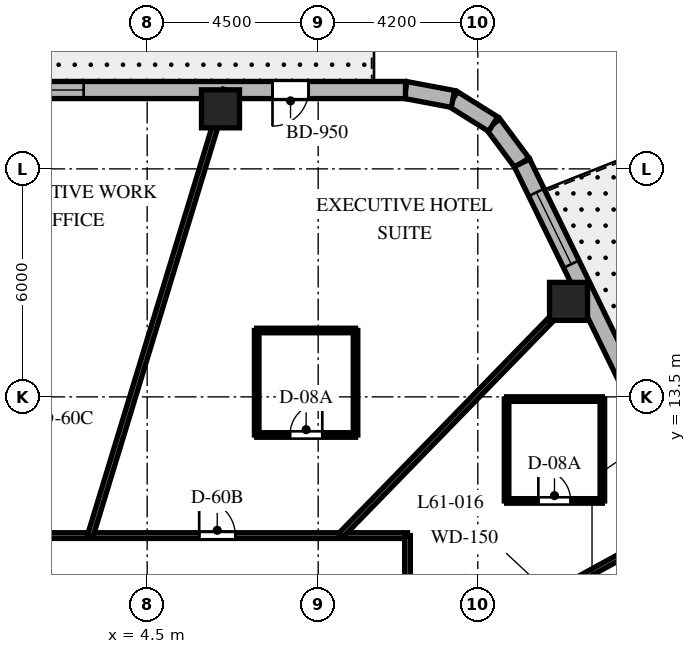
"""IFC4 building model, lengths in metres.
Left out: names, types, materials, properties, quantities, classifications, styles, units other than length and angle.
Written with IfcOpenShell. Run it as: python <this file> out.ifc"""

import sys

from ifc_helpers import new_model, si_unit, direction, frame, frame_2d, origin, origin_2d, place, context, subcontext, project, spatial, rectangle, extrude, element, fill, save


model = new_model("IFC4")
c1 = context("Model", 3, precision=1e-05, world=origin(), true_north=direction((0.0, 1.0)))
c2 = subcontext(c1, "Body", "Model", "MODEL_VIEW")
j1 = project(units=[si_unit("LENGTHUNIT", "METRE"), si_unit("PLANEANGLEUNIT", "RADIAN")], contexts=[c1])
p1 = place(None, origin())
s1 = spatial("IfcSite", under=j1, at=p1, CompositionType="ELEMENT")
p2 = place(p1, origin())
s2 = spatial("IfcBuilding", under=s1, at=p2, CompositionType="ELEMENT")
p3 = place(p2, frame((0.0, 0.0, 244.5)))
s3 = spatial("IfcBuildingStorey", under=s2, at=p3, CompositionType="ELEMENT", Elevation=244.5)
for number, where, z_axis, x_axis in (
    (1, (15.587, 16.013, 0.0), (0.0, 0.0, 1.0), (1.0, 0.0, 0.0)),
    (2, (6.43, 21.08, 0.0), (0.0, 0.0, 1.0), (1.0, 0.0, 0.0)),
):
    element("IfcColumn", number, at=place(p3, frame(where, z_axis=z_axis, x_axis=x_axis)), inside=s3, PredefinedType="COLUMN", context=c2, shape_type="SweptSolid", body=[
        extrude(rectangle(XDim=1.0, YDim=1.0, at=origin_2d()), origin(), (0.0, 0.0, 1.0), 3.8),
    ])
p4 = place(p3, frame((14.362, 19.658, 0.0), z_axis=(0.0, 0.0, 1.0), x_axis=(-0.596642462792, 0.80250717853, 0.0)))
e3 = element("IfcWall", 3, at=p4, inside=s3, PredefinedType="SOLIDWALL", context=c2, shape_type="SweptSolid", body=[
    extrude(rectangle(XDim=1.27, YDim=0.45, at=frame_2d((0.635, 0.0))), origin(), (0.0, 0.0, 1.0), 3.5),
])
p5 = place(p3, frame((13.604, 20.678, 0.0), z_axis=(0.0, 0.0, 1.0), x_axis=(-0.847910404124, 0.53013955387, 0.0)))
e4 = element("IfcWall", 4, at=p5, inside=s3, PredefinedType="SOLIDWALL", context=c2, shape_type="SweptSolid", body=[
    extrude(rectangle(XDim=1.249, YDim=0.45, at=frame_2d((0.624, 0.0))), origin(), (0.0, 0.0, 1.0), 3.5),
])
p6 = place(p3, frame((12.546, 21.34, 0.0), z_axis=(0.0, 0.0, 1.0), x_axis=(-0.982686750835, 0.18527479519, 0.0)))
e5 = element("IfcWall", 5, at=p6, inside=s3, PredefinedType="SOLIDWALL", context=c2, shape_type="SweptSolid", body=[
    extrude(rectangle(XDim=1.27, YDim=0.45, at=frame_2d((0.635, 0.0))), origin(), (0.0, 0.0, 1.0), 3.5),
])
p7 = place(p3, frame((22.74, 2.452, 0.0), z_axis=(0.0, 0.0, 1.0), x_axis=(-0.437753424814, 0.899095066755, 0.0)))
e6 = element("IfcWall", 6, at=p7, inside=s3, PredefinedType="SOLIDWALL", context=c2, shape_type="SweptSolid", body=[
    extrude(rectangle(XDim=19.137, YDim=0.45, at=frame_2d((9.569, 0.0))), origin(), (0.0, 0.0, 1.0), 3.5),
])
p8 = place(p7, frame((4.763, 0.0, 0.0)))
e7 = element("IfcOpeningElement", 7, at=p8, cuts=e6, PredefinedType="OPENING", context=c2, shape_type="SweptSolid", body=[
    extrude(rectangle(XDim=1.0, YDim=2.15, at=frame_2d((0.5, 1.075))), frame((0.0, 0.235, 0.0), z_axis=(0.0, -1.0, 0.0), x_axis=(1.0, 0.0, 0.0)), (0.0, 0.0, 1.0), 0.47),
])
p9 = place(p7, frame((6.611, 0.0, 0.8)))
e8 = element("IfcOpeningElement", 8, at=p9, cuts=e6, PredefinedType="OPENING", context=c2, shape_type="SweptSolid", body=[
    extrude(rectangle(XDim=1.2, YDim=1.8, at=frame_2d((0.6, 0.9))), frame((0.0, 0.235, 0.0), z_axis=(0.0, -1.0, 0.0), x_axis=(1.0, 0.0, 0.0)), (0.0, 0.0, 1.0), 0.47),
])
p10 = place(p7, frame((10.856, 0.0, 0.8)))
e9 = element("IfcOpeningElement", 9, at=p10, cuts=e6, PredefinedType="OPENING", context=c2, shape_type="SweptSolid", body=[
    extrude(rectangle(XDim=2.1, YDim=1.85, at=frame_2d((1.05, 0.925))), frame((0.0, 0.235, 0.0), z_axis=(0.0, -1.0, 0.0), x_axis=(1.0, 0.0, 0.0)), (0.0, 0.0, 1.0), 0.47),
])
p11 = place(p7, frame((16.173, 0.0, 0.8)))
e10 = element("IfcOpeningElement", 10, at=p11, cuts=e6, PredefinedType="OPENING", context=c2, shape_type="SweptSolid", body=[
    extrude(rectangle(XDim=2.1, YDim=1.85, at=frame_2d((1.05, 0.925))), frame((0.0, 0.235, 0.0), z_axis=(0.0, -1.0, 0.0), x_axis=(1.0, 0.0, 0.0)), (0.0, 0.0, 1.0), 0.47),
])
p12 = place(p7, frame((0.916, 0.0, 0.8)))
e11 = element("IfcOpeningElement", 11, at=p12, cuts=e6, PredefinedType="OPENING", context=c2, shape_type="SweptSolid", body=[
    extrude(rectangle(XDim=2.1, YDim=1.85, at=frame_2d((1.05, 0.925))), frame((0.0, 0.235, 0.0), z_axis=(0.0, -1.0, 0.0), x_axis=(1.0, 0.0, 0.0)), (0.0, 0.0, 1.0), 0.47),
])
p13 = place(p3, frame((11.298, 21.575, 0.0), z_axis=(0.0, 0.0, 1.0), x_axis=(-1.0, 0.0, 0.0)))
e12 = element("IfcWall", 12, at=p13, inside=s3, PredefinedType="SOLIDWALL", context=c2, shape_type="SweptSolid", body=[
    extrude(rectangle(XDim=24.399, YDim=0.45, at=frame_2d((12.2, 0.0))), origin(), (0.0, 0.0, 1.0), 3.5),
])
p14 = place(p13, frame((2.55, 0.0, 0.0)))
e13 = element("IfcOpeningElement", 13, at=p14, cuts=e12, PredefinedType="OPENING", context=c2, shape_type="SweptSolid", body=[
    extrude(rectangle(XDim=0.95, YDim=2.15, at=frame_2d((0.475, 1.075))), frame((0.0, 0.235, 0.0), z_axis=(0.0, -1.0, 0.0), x_axis=(1.0, 0.0, 0.0)), (0.0, 0.0, 1.0), 0.47),
])
p15 = place(p13, frame((8.469, 0.0, 0.8)))
e14 = element("IfcOpeningElement", 14, at=p15, cuts=e12, PredefinedType="OPENING", context=c2, shape_type="SweptSolid", body=[
    extrude(rectangle(XDim=1.5, YDim=1.8, at=frame_2d((0.75, 0.9))), frame((0.0, 0.235, 0.0), z_axis=(0.0, -1.0, 0.0), x_axis=(1.0, 0.0, 0.0)), (0.0, 0.0, 1.0), 0.47),
])
p16 = place(p13, frame((15.222, 0.0, 0.8)))
e15 = element("IfcOpeningElement", 15, at=p16, cuts=e12, PredefinedType="OPENING", context=c2, shape_type="SweptSolid", body=[
    extrude(rectangle(XDim=1.5, YDim=1.8, at=frame_2d((0.75, 0.9))), frame((0.0, 0.235, 0.0), z_axis=(0.0, -1.0, 0.0), x_axis=(1.0, 0.0, 0.0)), (0.0, 0.0, 1.0), 0.47),
])
p17 = place(p13, frame((21.296, 0.0, 0.8)))
e16 = element("IfcOpeningElement", 16, at=p17, cuts=e12, PredefinedType="OPENING", context=c2, shape_type="SweptSolid", body=[
    extrude(rectangle(XDim=1.5, YDim=1.8, at=frame_2d((0.75, 0.9))), frame((0.0, 0.235, 0.0), z_axis=(0.0, -1.0, 0.0), x_axis=(1.0, 0.0, 0.0)), (0.0, 0.0, 1.0), 0.47),
])
p18 = place(p3, frame((0.92, 9.85, 0.0), z_axis=(0.0, 0.0, 1.0), x_axis=(1.0, 0.0, 0.0)))
e17 = element("IfcWall", 17, at=p18, inside=s3, PredefinedType="PARTITIONING", context=c2, shape_type="SweptSolid", body=[
    extrude(rectangle(XDim=10.43, YDim=0.15, at=frame_2d((5.215, 0.0))), origin(), (0.0, 0.0, 1.0), 2.99),
])
p19 = place(p18, frame((4.949, 0.0, 0.0)))
e18 = element("IfcOpeningElement", 18, at=p19, cuts=e17, PredefinedType="OPENING", context=c2, shape_type="SweptSolid", body=[
    extrude(rectangle(XDim=0.95, YDim=2.03, at=frame_2d((0.475, 1.015))), frame((0.0, 0.085, 0.0), z_axis=(0.0, -1.0, 0.0), x_axis=(1.0, 0.0, 0.0)), (0.0, 0.0, 1.0), 0.17),
])
p20 = place(p3, frame((11.35, 9.85, 0.0), z_axis=(0.0, 0.0, 1.0), x_axis=(0.0, -1.0, 0.0)))
e19 = element("IfcWall", 19, at=p20, inside=s3, PredefinedType="PARTITIONING", context=c2, shape_type="SweptSolid", body=[
    extrude(rectangle(XDim=12.4, YDim=0.15, at=frame_2d((6.2, 0.0))), origin(), (0.0, 0.0, 1.0), 2.99),
])
p21 = place(p20, frame((4.709, 0.0, 0.0)))
e20 = element("IfcOpeningElement", 20, at=p21, cuts=e19, PredefinedType="OPENING", context=c2, shape_type="SweptSolid", body=[
    extrude(rectangle(XDim=0.9, YDim=2.03, at=frame_2d((0.45, 1.015))), frame((0.0, 0.085, 0.0), z_axis=(0.0, -1.0, 0.0), x_axis=(1.0, 0.0, 0.0)), (0.0, 0.0, 1.0), 0.17),
])
p22 = place(p20, frame((1.457, 0.0, 0.0)))
e21 = element("IfcOpeningElement", 21, at=p22, cuts=e19, PredefinedType="OPENING", context=c2, shape_type="SweptSolid", body=[
    extrude(rectangle(XDim=0.95, YDim=2.03, at=frame_2d((0.475, 1.015))), frame((0.0, 0.085, 0.0), z_axis=(0.0, -1.0, 0.0), x_axis=(1.0, 0.0, 0.0)), (0.0, 0.0, 1.0), 0.17),
])
p23 = place(p20, frame((8.835, 0.0, 0.0)))
e22 = element("IfcOpeningElement", 22, at=p23, cuts=e19, PredefinedType="OPENING", context=c2, shape_type="SweptSolid", body=[
    extrude(rectangle(XDim=0.95, YDim=2.03, at=frame_2d((0.475, 1.015))), frame((0.0, 0.085, 0.0), z_axis=(0.0, -1.0, 0.0), x_axis=(1.0, 0.0, 0.0)), (0.0, 0.0, 1.0), 0.17),
])
p24 = place(p3, frame((11.35, 6.227, 0.0), z_axis=(0.0, 0.0, 1.0), x_axis=(0.876723190824, 0.480995266786, 0.0)))
e23 = element("IfcWall", 23, at=p24, inside=s3, PredefinedType="PARTITIONING", context=c2, shape_type="SweptSolid", body=[
    extrude(rectangle(XDim=8.598, YDim=0.15, at=frame_2d((4.299, 0.0))), origin(), (0.0, 0.0, 1.0), 2.74),
])
p25 = place(p3, frame((9.588, 9.85, 0.0), z_axis=(0.0, 0.0, 1.0), x_axis=(0.697519469595, 0.716565830567, 0.0)))
e24 = element("IfcWall", 24, at=p25, inside=s3, PredefinedType="PARTITIONING", context=c2, shape_type="SweptSolid", body=[
    extrude(rectangle(XDim=9.126, YDim=0.15, at=frame_2d((4.563, 0.0))), origin(), (0.0, 0.0, 1.0), 2.74),
])
p26 = place(p3, frame((3.004, 9.85, 0.0), z_axis=(0.0, 0.0, 1.0), x_axis=(0.291775760688, 0.956486751333, 0.0)))
e25 = element("IfcWall", 25, at=p26, inside=s3, PredefinedType="PARTITIONING", context=c2, shape_type="SweptSolid", body=[
    extrude(rectangle(XDim=12.258, YDim=0.15, at=frame_2d((6.129, 0.0))), origin(), (0.0, 0.0, 1.0), 2.74),
])
p27 = place(p3, frame((13.958, 10.762, 0.0), z_axis=(0.0, 0.0, 1.0), x_axis=(1.0, 0.0, 0.0)))
e26 = element("IfcWall", 26, at=p27, inside=s3, PredefinedType="PARTITIONING", context=c2, shape_type="SweptSolid", body=[
    extrude(rectangle(XDim=2.52, YDim=0.12, at=frame_2d((1.26, 0.0))), origin(), (0.0, 0.0, 1.0), 3.027),
])
p28 = place(p27, frame((0.835, 0.0, 0.0)))
e27 = element("IfcOpeningElement", 27, at=p28, cuts=e26, PredefinedType="OPENING", context=c2, shape_type="SweptSolid", body=[
    extrude(rectangle(XDim=0.85, YDim=2.03, at=frame_2d((0.425, 1.015))), frame((0.0, 0.07, 0.0), z_axis=(0.0, -1.0, 0.0), x_axis=(1.0, 0.0, 0.0)), (0.0, 0.0, 1.0), 0.14),
])
p29 = place(p3, frame((16.478, 10.762, 0.0), z_axis=(0.0, 0.0, 1.0), x_axis=(0.0, 1.0, 0.0)))
e28 = element("IfcWall", 28, at=p29, inside=s3, PredefinedType="PARTITIONING", context=c2, shape_type="SweptSolid", body=[
    extrude(rectangle(XDim=2.68, YDim=0.12, at=frame_2d((1.34, 0.0))), origin(), (0.0, 0.0, 1.0), 3.5),
])
p30 = place(p3, frame((16.478, 13.442, 0.0), z_axis=(0.0, 0.0, 1.0), x_axis=(-1.0, 0.0, 0.0)))
e29 = element("IfcWall", 29, at=p30, inside=s3, PredefinedType="PARTITIONING", context=c2, shape_type="SweptSolid", body=[
    extrude(rectangle(XDim=2.52, YDim=0.12, at=frame_2d((1.26, 0.0))), origin(), (0.0, 0.0, 1.0), 3.5),
])
p31 = place(p3, frame((13.958, 13.442, 0.0), z_axis=(0.0, 0.0, 1.0), x_axis=(0.0, -1.0, 0.0)))
e30 = element("IfcWall", 30, at=p31, inside=s3, PredefinedType="PARTITIONING", context=c2, shape_type="SweptSolid", body=[
    extrude(rectangle(XDim=2.68, YDim=0.12, at=frame_2d((1.34, 0.0))), origin(), (0.0, 0.0, 1.0), 3.027),
])
p32 = place(p3, frame((7.383, 12.497, 0.0), z_axis=(0.0, 0.0, 1.0), x_axis=(1.0, 0.0, 0.0)))
e31 = element("IfcWall", 31, at=p32, inside=s3, PredefinedType="PARTITIONING", context=c2, shape_type="SweptSolid", body=[
    extrude(rectangle(XDim=2.6, YDim=0.12, at=frame_2d((1.3, 0.0))), origin(), (0.0, 0.0, 1.0), 2.94),
])
p33 = place(p32, frame((0.875, 0.0, 0.0)))
e32 = element("IfcOpeningElement", 32, at=p33, cuts=e31, PredefinedType="OPENING", context=c2, shape_type="SweptSolid", body=[
    extrude(rectangle(XDim=0.85, YDim=2.03, at=frame_2d((0.425, 1.015))), frame((0.0, 0.07, 0.0), z_axis=(0.0, -1.0, 0.0), x_axis=(1.0, 0.0, 0.0)), (0.0, 0.0, 1.0), 0.14),
])
p34 = place(p3, frame((9.983, 12.497, 0.0), z_axis=(0.0, 0.0, 1.0), x_axis=(0.0, 1.0, 0.0)))
e33 = element("IfcWall", 33, at=p34, inside=s3, PredefinedType="PARTITIONING", context=c2, shape_type="SweptSolid", body=[
    extrude(rectangle(XDim=2.75, YDim=0.12, at=frame_2d((1.375, 0.0))), origin(), (0.0, 0.0, 1.0), 3.073),
])
p35 = place(p3, frame((9.983, 15.247, 0.0), z_axis=(0.0, 0.0, 1.0), x_axis=(-1.0, 0.0, 0.0)))
e34 = element("IfcWall", 34, at=p35, inside=s3, PredefinedType="PARTITIONING", context=c2, shape_type="SweptSolid", body=[
    extrude(rectangle(XDim=2.6, YDim=0.12, at=frame_2d((1.3, 0.0))), origin(), (0.0, 0.0, 1.0), 3.073),
])
p36 = place(p3, frame((7.383, 15.247, 0.0), z_axis=(0.0, 0.0, 1.0), x_axis=(0.0, -1.0, 0.0)))
e35 = element("IfcWall", 35, at=p36, inside=s3, PredefinedType="PARTITIONING", context=c2, shape_type="SweptSolid", body=[
    extrude(rectangle(XDim=2.75, YDim=0.12, at=frame_2d((1.375, 0.0))), origin(), (0.0, 0.0, 1.0), 2.94),
])
p37 = place(p11, origin())
e36 = element("IfcWindow", 36, at=p37, inside=s3, PartitioningType="SINGLE_PANEL", PredefinedType="WINDOW", context=c2, shape_type="SweptSolid", body=[
    extrude(rectangle(XDim=2.1, YDim=1.85, at=frame_2d((1.05, 0.925))), frame((0.0, 0.03, 0.0), z_axis=(0.0, -1.0, 0.0), x_axis=(1.0, 0.0, 0.0)), (0.0, 0.0, 1.0), 0.06),
])
fill(e10, e36)
p38 = place(p14, origin())
e37 = element("IfcDoor", 37, at=p38, inside=s3, OperationType="SINGLE_SWING_RIGHT", PredefinedType="DOOR", context=c2, shape_type="SweptSolid", body=[
    extrude(rectangle(XDim=0.95, YDim=2.15, at=frame_2d((0.475, 1.075))), frame((0.0, 0.025, 0.0), z_axis=(0.0, -1.0, 0.0), x_axis=(1.0, 0.0, 0.0)), (0.0, 0.0, 1.0), 0.05),
])
fill(e13, e37)
p39 = place(p15, origin())
e38 = element("IfcWindow", 38, at=p39, inside=s3, PartitioningType="SINGLE_PANEL", PredefinedType="WINDOW", context=c2, shape_type="SweptSolid", body=[
    extrude(rectangle(XDim=1.5, YDim=1.8, at=frame_2d((0.75, 0.9))), frame((0.0, 0.03, 0.0), z_axis=(0.0, -1.0, 0.0), x_axis=(1.0, 0.0, 0.0)), (0.0, 0.0, 1.0), 0.06),
])
fill(e14, e38)
p40 = place(p28, origin())
e39 = element("IfcDoor", 39, at=p40, inside=s3, OperationType="SINGLE_SWING_LEFT", PredefinedType="DOOR", context=c2, shape_type="SweptSolid", body=[
    extrude(rectangle(XDim=0.85, YDim=2.03, at=frame_2d((0.425, 1.015))), frame((0.0, 0.025, 0.0), z_axis=(0.0, -1.0, 0.0), x_axis=(1.0, 0.0, 0.0)), (0.0, 0.0, 1.0), 0.05),
])
fill(e27, e39)
p41 = place(p19, origin())
e40 = element("IfcDoor", 40, at=p41, inside=s3, OperationType="SINGLE_SWING_LEFT", PredefinedType="DOOR", context=c2, shape_type="SweptSolid", body=[
    extrude(rectangle(XDim=0.95, YDim=2.03, at=frame_2d((0.475, 1.015))), frame((0.0, 0.025, 0.0), z_axis=(0.0, -1.0, 0.0), x_axis=(1.0, 0.0, 0.0)), (0.0, 0.0, 1.0), 0.05),
])
fill(e18, e40)
p42 = place(p33, origin())
e41 = element("IfcDoor", 41, at=p42, inside=s3, OperationType="SINGLE_SWING_RIGHT", PredefinedType="DOOR", context=c2, shape_type="SweptSolid", body=[
    extrude(rectangle(XDim=0.85, YDim=2.03, at=frame_2d((0.425, 1.015))), frame((0.0, 0.025, 0.0), z_axis=(0.0, -1.0, 0.0), x_axis=(1.0, 0.0, 0.0)), (0.0, 0.0, 1.0), 0.05),
])
fill(e32, e41)
save(model, sys.argv[1])
